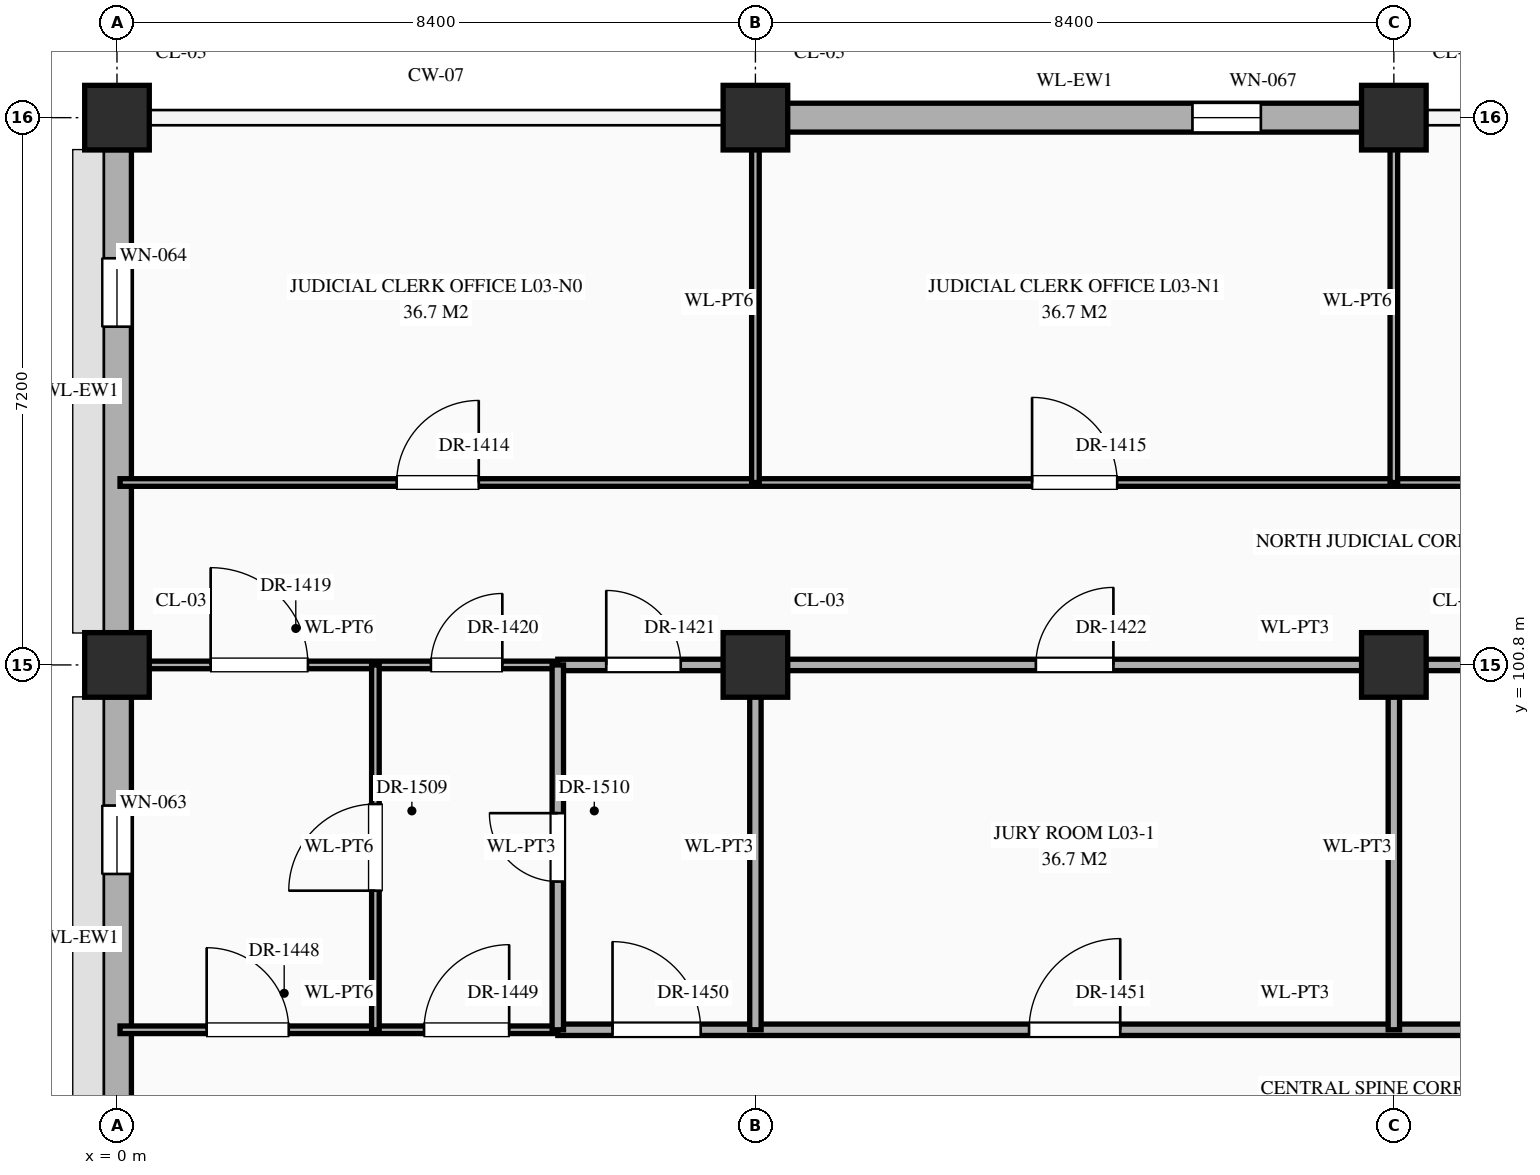
"""IFC4 building model, lengths in metres.
Left out: names, types, materials, properties, quantities, classifications, styles, units other than length and angle.
Written with IfcOpenShell. Run it as: python <this file> out.ifc"""

import sys

from ifc_helpers import new_model, si_unit, direction, frame, frame_2d, origin, origin_2d, place, context, subcontext, project, spatial, rectangle, extrude, element, fill, save


model = new_model("IFC4")
c1 = context("Model", 3, precision=1e-05, world=origin(), true_north=direction((0.0, 1.0)))
c2 = subcontext(c1, "Body", "Model", "MODEL_VIEW")
j1 = project(units=[si_unit("LENGTHUNIT", "METRE"), si_unit("PLANEANGLEUNIT", "RADIAN")], contexts=[c1])
p1 = place(None, origin())
s1 = spatial("IfcSite", under=j1, at=p1, CompositionType="ELEMENT")
p2 = place(p1, origin())
s2 = spatial("IfcBuilding", under=s1, at=p2, CompositionType="ELEMENT")
p3 = place(p2, frame((0.0, 0.0, 10.8)))
s3 = spatial("IfcBuildingStorey", under=s2, at=p3, CompositionType="ELEMENT", Elevation=10.8)
for number, where, z_axis, x_axis in (
    (1, (0.0, 100.8, 0.0), (0.0, 0.0, 1.0), (1.0, 0.0, 0.0)),
    (2, (0.0, 108.0, 0.0), (0.0, 0.0, 1.0), (1.0, 0.0, 0.0)),
    (3, (8.4, 100.8, 0.0), (0.0, 0.0, 1.0), (1.0, 0.0, 0.0)),
    (4, (8.4, 108.0, 0.0), (0.0, 0.0, 1.0), (1.0, 0.0, 0.0)),
    (5, (16.8, 100.8, 0.0), (0.0, 0.0, 1.0), (1.0, 0.0, 0.0)),
    (6, (16.8, 108.0, 0.0), (0.0, 0.0, 1.0), (1.0, 0.0, 0.0)),
):
    element("IfcColumn", number, at=place(p3, frame(where, z_axis=z_axis, x_axis=x_axis)), inside=s3, PredefinedType="COLUMN", context=c2, shape_type="SweptSolid", body=[
        extrude(rectangle(XDim=0.85, YDim=0.85, at=origin_2d()), origin(), (0.0, 0.0, 1.0), 5.4),
    ])
p4 = place(p3, frame((0.0, 94.02, 0.0), z_axis=(0.0, 0.0, 1.0), x_axis=(0.0, 1.0, 0.0)))
e7 = element("IfcWall", 7, at=p4, inside=s3, PredefinedType="STANDARD", context=c2, shape_type="SweptSolid", body=[
    extrude(rectangle(XDim=6.36, YDim=0.38, at=frame_2d((3.18, 0.0))), origin(), (0.0, 0.0, 1.0), 4.47),
])
p5 = place(p4, frame((4.03, 0.0, 0.85)))
e8 = element("IfcOpeningElement", 8, at=p5, cuts=e7, PredefinedType="OPENING", context=c2, shape_type="SweptSolid", body=[
    extrude(rectangle(XDim=0.9, YDim=1.56, at=frame_2d((0.45, 0.78))), frame((0.0, 0.202, 0.0), z_axis=(0.0, -1.0, 0.0), x_axis=(1.0, 0.0, 0.0)), (0.0, 0.0, 1.0), 0.404),
])
p6 = place(p3, frame((0.0, 101.22, 0.0), z_axis=(0.0, 0.0, 1.0), x_axis=(0.0, 1.0, 0.0)))
e9 = element("IfcWall", 9, at=p6, inside=s3, PredefinedType="STANDARD", context=c2, shape_type="SweptSolid", body=[
    extrude(rectangle(XDim=6.36, YDim=0.38, at=frame_2d((3.18, 0.0))), origin(), (0.0, 0.0, 1.0), 4.47),
])
p7 = place(p6, frame((4.03, 0.0, 0.85)))
e10 = element("IfcOpeningElement", 10, at=p7, cuts=e9, PredefinedType="OPENING", context=c2, shape_type="SweptSolid", body=[
    extrude(rectangle(XDim=0.9, YDim=1.74, at=frame_2d((0.45, 0.87))), frame((0.0, 0.202, 0.0), z_axis=(0.0, -1.0, 0.0), x_axis=(1.0, 0.0, 0.0)), (0.0, 0.0, 1.0), 0.404),
])
p8 = place(p3, frame((8.82, 108.0, 0.0), z_axis=(0.0, 0.0, 1.0), x_axis=(1.0, 0.0, 0.0)))
e11 = element("IfcWall", 11, at=p8, inside=s3, PredefinedType="STANDARD", context=c2, shape_type="SweptSolid", body=[
    extrude(rectangle(XDim=7.56, YDim=0.38, at=frame_2d((3.78, 0.0))), origin(), (0.0, 0.0, 1.0), 4.47),
])
p9 = place(p8, frame((5.33, 0.0, 0.85)))
e12 = element("IfcOpeningElement", 12, at=p9, cuts=e11, PredefinedType="OPENING", context=c2, shape_type="SweptSolid", body=[
    extrude(rectangle(XDim=0.9, YDim=1.92, at=frame_2d((0.45, 0.96))), frame((0.0, 0.202, 0.0), z_axis=(0.0, -1.0, 0.0), x_axis=(1.0, 0.0, 0.0)), (0.0, 0.0, 1.0), 0.404),
])
p10 = place(p3, frame((0.04, 96.0, 0.0), z_axis=(0.0, 0.0, 1.0), x_axis=(1.0, 0.0, 0.0)))
e13 = element("IfcWall", 13, at=p10, inside=s3, PredefinedType="STANDARD", context=c2, shape_type="SweptSolid", body=[
    extrude(rectangle(XDim=5.76, YDim=0.1, at=frame_2d((2.88, 0.0))), origin(), (0.0, 0.0, 1.0), 5.12),
])
p11 = place(p10, frame((1.14, 0.0, 0.0)))
e14 = element("IfcOpeningElement", 14, at=p11, cuts=e13, PredefinedType="OPENING", context=c2, shape_type="SweptSolid", body=[
    extrude(rectangle(XDim=1.08, YDim=2.25, at=frame_2d((0.54, 1.125))), frame((0.0, 0.062, 0.0), z_axis=(0.0, -1.0, 0.0), x_axis=(1.0, 0.0, 0.0)), (0.0, 0.0, 1.0), 0.124),
])
p12 = place(p10, frame((4.0, 0.0, 0.0)))
e15 = element("IfcOpeningElement", 15, at=p12, cuts=e13, PredefinedType="OPENING", context=c2, shape_type="SweptSolid", body=[
    extrude(rectangle(XDim=1.12, YDim=2.25, at=frame_2d((0.56, 1.125))), frame((0.0, 0.062, 0.0), z_axis=(0.0, -1.0, 0.0), x_axis=(1.0, 0.0, 0.0)), (0.0, 0.0, 1.0), 0.124),
])
p13 = place(p3, frame((5.8, 96.0, 0.0), z_axis=(0.0, 0.0, 1.0), x_axis=(1.0, 0.0, 0.0)))
e16 = element("IfcWall", 16, at=p13, inside=s3, PredefinedType="STANDARD", context=c2, shape_type="SweptSolid", body=[
    extrude(rectangle(XDim=19.4, YDim=0.15, at=frame_2d((9.7, 0.0))), origin(), (0.0, 0.0, 1.0), 5.12),
])
p14 = place(p13, frame((0.72, 0.0, 0.0)))
e17 = element("IfcOpeningElement", 17, at=p14, cuts=e16, PredefinedType="OPENING", context=c2, shape_type="SweptSolid", body=[
    extrude(rectangle(XDim=1.16, YDim=2.3, at=frame_2d((0.58, 1.15))), frame((0.0, 0.087, 0.0), z_axis=(0.0, -1.0, 0.0), x_axis=(1.0, 0.0, 0.0)), (0.0, 0.0, 1.0), 0.174),
])
p15 = place(p13, frame((6.2, 0.0, 0.0)))
e18 = element("IfcOpeningElement", 18, at=p15, cuts=e16, PredefinedType="OPENING", context=c2, shape_type="SweptSolid", body=[
    extrude(rectangle(XDim=1.2, YDim=2.35, at=frame_2d((0.6, 1.175))), frame((0.0, 0.087, 0.0), z_axis=(0.0, -1.0, 0.0), x_axis=(1.0, 0.0, 0.0)), (0.0, 0.0, 1.0), 0.174),
])
p16 = place(p13, frame((14.58, 0.0, 0.0)))
e19 = element("IfcOpeningElement", 19, at=p16, cuts=e16, PredefinedType="OPENING", context=c2, shape_type="SweptSolid", body=[
    extrude(rectangle(XDim=1.24, YDim=2.3, at=frame_2d((0.62, 1.15))), frame((0.0, 0.087, 0.0), z_axis=(0.0, -1.0, 0.0), x_axis=(1.0, 0.0, 0.0)), (0.0, 0.0, 1.0), 0.174),
])
p17 = place(p3, frame((0.04, 100.8, 0.0), z_axis=(0.0, 0.0, 1.0), x_axis=(1.0, 0.0, 0.0)))
e20 = element("IfcWall", 20, at=p17, inside=s3, PredefinedType="STANDARD", context=c2, shape_type="SweptSolid", body=[
    extrude(rectangle(XDim=5.76, YDim=0.1, at=frame_2d((2.88, 0.0))), origin(), (0.0, 0.0, 1.0), 4.27),
])
p18 = place(p17, frame((1.192, 0.0, 0.0)))
e21 = element("IfcOpeningElement", 21, at=p18, cuts=e20, PredefinedType="OPENING", context=c2, shape_type="SweptSolid", body=[
    extrude(rectangle(XDim=1.28, YDim=2.35, at=frame_2d((0.64, 1.175))), frame((0.0, 0.062, 0.0), z_axis=(0.0, -1.0, 0.0), x_axis=(1.0, 0.0, 0.0)), (0.0, 0.0, 1.0), 0.124),
])
p19 = place(p17, frame((4.09, 0.0, 0.0)))
e22 = element("IfcOpeningElement", 22, at=p19, cuts=e20, PredefinedType="OPENING", context=c2, shape_type="SweptSolid", body=[
    extrude(rectangle(XDim=0.94, YDim=2.3, at=frame_2d((0.47, 1.15))), frame((0.0, 0.062, 0.0), z_axis=(0.0, -1.0, 0.0), x_axis=(1.0, 0.0, 0.0)), (0.0, 0.0, 1.0), 0.124),
])
p20 = place(p3, frame((5.8, 100.8, 0.0), z_axis=(0.0, 0.0, 1.0), x_axis=(1.0, 0.0, 0.0)))
e23 = element("IfcWall", 23, at=p20, inside=s3, PredefinedType="STANDARD", context=c2, shape_type="SweptSolid", body=[
    extrude(rectangle(XDim=19.4, YDim=0.15, at=frame_2d((9.7, 0.0))), origin(), (0.0, 0.0, 1.0), 4.27),
])
p21 = place(p20, frame((0.637, 0.0, 0.0)))
e24 = element("IfcOpeningElement", 24, at=p21, cuts=e23, PredefinedType="OPENING", context=c2, shape_type="SweptSolid", body=[
    extrude(rectangle(XDim=0.98, YDim=2.35, at=frame_2d((0.49, 1.175))), frame((0.0, 0.087, 0.0), z_axis=(0.0, -1.0, 0.0), x_axis=(1.0, 0.0, 0.0)), (0.0, 0.0, 1.0), 0.174),
])
p22 = place(p20, frame((6.29, 0.0, 0.0)))
e25 = element("IfcOpeningElement", 25, at=p22, cuts=e23, PredefinedType="OPENING", context=c2, shape_type="SweptSolid", body=[
    extrude(rectangle(XDim=1.02, YDim=2.4, at=frame_2d((0.51, 1.2))), frame((0.0, 0.087, 0.0), z_axis=(0.0, -1.0, 0.0), x_axis=(1.0, 0.0, 0.0)), (0.0, 0.0, 1.0), 0.174),
])
p23 = place(p20, frame((14.67, 0.0, 0.0)))
e26 = element("IfcOpeningElement", 26, at=p23, cuts=e23, PredefinedType="OPENING", context=c2, shape_type="SweptSolid", body=[
    extrude(rectangle(XDim=1.06, YDim=2.4, at=frame_2d((0.53, 1.2))), frame((0.0, 0.087, 0.0), z_axis=(0.0, -1.0, 0.0), x_axis=(1.0, 0.0, 0.0)), (0.0, 0.0, 1.0), 0.174),
])
p24 = place(p3, frame((0.04, 103.2, 0.0), z_axis=(0.0, 0.0, 1.0), x_axis=(1.0, 0.0, 0.0)))
e27 = element("IfcWall", 27, at=p24, inside=s3, PredefinedType="STANDARD", context=c2, shape_type="SweptSolid", body=[
    extrude(rectangle(XDim=41.96, YDim=0.1, at=frame_2d((20.98, 0.0))), origin(), (0.0, 0.0, 1.0), 5.12),
])
p25 = place(p24, frame((3.64, 0.0, 0.0)))
e28 = element("IfcOpeningElement", 28, at=p25, cuts=e27, PredefinedType="OPENING", context=c2, shape_type="SweptSolid", body=[
    extrude(rectangle(XDim=1.08, YDim=2.25, at=frame_2d((0.54, 1.125))), frame((0.0, 0.062, 0.0), z_axis=(0.0, -1.0, 0.0), x_axis=(1.0, 0.0, 0.0)), (0.0, 0.0, 1.0), 0.124),
])
p26 = place(p24, frame((12.0, 0.0, 0.0)))
e29 = element("IfcOpeningElement", 29, at=p26, cuts=e27, PredefinedType="OPENING", context=c2, shape_type="SweptSolid", body=[
    extrude(rectangle(XDim=1.12, YDim=2.25, at=frame_2d((0.56, 1.125))), frame((0.0, 0.062, 0.0), z_axis=(0.0, -1.0, 0.0), x_axis=(1.0, 0.0, 0.0)), (0.0, 0.0, 1.0), 0.124),
])
p27 = place(p24, frame((20.38, 0.0, 0.0)))
e30 = element("IfcOpeningElement", 30, at=p27, cuts=e27, PredefinedType="OPENING", context=c2, shape_type="SweptSolid", body=[
    extrude(rectangle(XDim=1.16, YDim=2.3, at=frame_2d((0.58, 1.15))), frame((0.0, 0.062, 0.0), z_axis=(0.0, -1.0, 0.0), x_axis=(1.0, 0.0, 0.0)), (0.0, 0.0, 1.0), 0.124),
])
p28 = place(p24, frame((28.76, 0.0, 0.0)))
e31 = element("IfcOpeningElement", 31, at=p28, cuts=e27, PredefinedType="OPENING", context=c2, shape_type="SweptSolid", body=[
    extrude(rectangle(XDim=1.2, YDim=2.35, at=frame_2d((0.6, 1.175))), frame((0.0, 0.062, 0.0), z_axis=(0.0, -1.0, 0.0), x_axis=(1.0, 0.0, 0.0)), (0.0, 0.0, 1.0), 0.124),
])
p29 = place(p24, frame((37.14, 0.0, 0.0)))
e32 = element("IfcOpeningElement", 32, at=p29, cuts=e27, PredefinedType="OPENING", context=c2, shape_type="SweptSolid", body=[
    extrude(rectangle(XDim=1.24, YDim=2.3, at=frame_2d((0.62, 1.15))), frame((0.0, 0.062, 0.0), z_axis=(0.0, -1.0, 0.0), x_axis=(1.0, 0.0, 0.0)), (0.0, 0.0, 1.0), 0.124),
])
p30 = place(p3, frame((3.4, 96.0, 0.0), z_axis=(0.0, 0.0, 1.0), x_axis=(0.0, 1.0, 0.0)))
e33 = element("IfcWall", 33, at=p30, inside=s3, PredefinedType="STANDARD", context=c2, shape_type="SweptSolid", body=[
    extrude(rectangle(XDim=4.8, YDim=0.1, at=frame_2d((2.4, 0.0))), origin(), (0.0, 0.0, 1.0), 5.12),
])
p31 = place(p30, frame((1.83, 0.0, 0.0)))
e34 = element("IfcOpeningElement", 34, at=p31, cuts=e33, PredefinedType="OPENING", context=c2, shape_type="SweptSolid", body=[
    extrude(rectangle(XDim=1.14, YDim=2.4, at=frame_2d((0.57, 1.2))), frame((0.0, 0.062, 0.0), z_axis=(0.0, -1.0, 0.0), x_axis=(1.0, 0.0, 0.0)), (0.0, 0.0, 1.0), 0.124),
])
p32 = place(p3, frame((5.8, 96.0, 0.0), z_axis=(0.0, 0.0, 1.0), x_axis=(0.0, 1.0, 0.0)))
e35 = element("IfcWall", 35, at=p32, inside=s3, PredefinedType="STANDARD", context=c2, shape_type="SweptSolid", body=[
    extrude(rectangle(XDim=4.8, YDim=0.15, at=frame_2d((2.4, 0.0))), origin(), (0.0, 0.0, 1.0), 5.12),
])
p33 = place(p32, frame((1.95, 0.0, 0.0)))
e36 = element("IfcOpeningElement", 36, at=p33, cuts=e35, PredefinedType="OPENING", context=c2, shape_type="SweptSolid", body=[
    extrude(rectangle(XDim=0.9, YDim=2.15, at=frame_2d((0.45, 1.075))), frame((0.0, 0.087, 0.0), z_axis=(0.0, -1.0, 0.0), x_axis=(1.0, 0.0, 0.0)), (0.0, 0.0, 1.0), 0.174),
])
p34 = place(p3, frame((8.4, 96.0, 0.0), z_axis=(0.0, 0.0, 1.0), x_axis=(0.0, 1.0, 0.0)))
e37 = element("IfcWall", 37, at=p34, inside=s3, PredefinedType="STANDARD", context=c2, shape_type="SweptSolid", body=[
    extrude(rectangle(XDim=4.8, YDim=0.15, at=frame_2d((2.4, 0.0))), origin(), (0.0, 0.0, 1.0), 4.37),
])
p35 = place(p3, frame((8.4, 103.2, 0.0), z_axis=(0.0, 0.0, 1.0), x_axis=(0.0, 1.0, 0.0)))
e38 = element("IfcWall", 38, at=p35, inside=s3, PredefinedType="STANDARD", context=c2, shape_type="SweptSolid", body=[
    extrude(rectangle(XDim=4.76, YDim=0.1, at=frame_2d((2.38, 0.0))), origin(), (0.0, 0.0, 1.0), 4.37),
])
p36 = place(p3, frame((16.8, 96.0, 0.0), z_axis=(0.0, 0.0, 1.0), x_axis=(0.0, 1.0, 0.0)))
e39 = element("IfcWall", 39, at=p36, inside=s3, PredefinedType="STANDARD", context=c2, shape_type="SweptSolid", body=[
    extrude(rectangle(XDim=4.8, YDim=0.15, at=frame_2d((2.4, 0.0))), origin(), (0.0, 0.0, 1.0), 4.37),
])
p37 = place(p3, frame((16.8, 103.2, 0.0), z_axis=(0.0, 0.0, 1.0), x_axis=(0.0, 1.0, 0.0)))
e40 = element("IfcWall", 40, at=p37, inside=s3, PredefinedType="STANDARD", context=c2, shape_type="SweptSolid", body=[
    extrude(rectangle(XDim=4.76, YDim=0.1, at=frame_2d((2.38, 0.0))), origin(), (0.0, 0.0, 1.0), 4.37),
])
p38 = place(p5, origin())
e41 = element("IfcWindow", 41, at=p38, inside=s3, PartitioningType="SINGLE_PANEL", PredefinedType="WINDOW", context=c2, shape_type="SweptSolid", body=[
    extrude(rectangle(XDim=0.9, YDim=1.56, at=frame_2d((0.45, 0.78))), frame((0.0, 0.03, 0.0), z_axis=(0.0, -1.0, 0.0), x_axis=(1.0, 0.0, 0.0)), (0.0, 0.0, 1.0), 0.06),
])
fill(e8, e41)
p39 = place(p7, origin())
e42 = element("IfcWindow", 42, at=p39, inside=s3, PartitioningType="SINGLE_PANEL", PredefinedType="WINDOW", context=c2, shape_type="SweptSolid", body=[
    extrude(rectangle(XDim=0.9, YDim=1.74, at=frame_2d((0.45, 0.87))), frame((0.0, 0.03, 0.0), z_axis=(0.0, -1.0, 0.0), x_axis=(1.0, 0.0, 0.0)), (0.0, 0.0, 1.0), 0.06),
])
fill(e10, e42)
p40 = place(p9, origin())
e43 = element("IfcWindow", 43, at=p40, inside=s3, PartitioningType="SINGLE_PANEL", PredefinedType="WINDOW", context=c2, shape_type="SweptSolid", body=[
    extrude(rectangle(XDim=0.9, YDim=1.92, at=frame_2d((0.45, 0.96))), frame((0.0, 0.03, 0.0), z_axis=(0.0, -1.0, 0.0), x_axis=(1.0, 0.0, 0.0)), (0.0, 0.0, 1.0), 0.06),
])
fill(e12, e43)
p41 = place(p25, origin())
e44 = element("IfcDoor", 44, at=p41, inside=s3, OperationType="SINGLE_SWING_RIGHT", PredefinedType="DOOR", context=c2, shape_type="SweptSolid", body=[
    extrude(rectangle(XDim=1.08, YDim=2.25, at=frame_2d((0.54, 1.125))), frame((0.0, 0.025, 0.0), z_axis=(0.0, -1.0, 0.0), x_axis=(1.0, 0.0, 0.0)), (0.0, 0.0, 1.0), 0.05),
])
fill(e28, e44)
p42 = place(p26, origin())
e45 = element("IfcDoor", 45, at=p42, inside=s3, OperationType="SINGLE_SWING_LEFT", PredefinedType="DOOR", context=c2, shape_type="SweptSolid", body=[
    extrude(rectangle(XDim=1.12, YDim=2.25, at=frame_2d((0.56, 1.125))), frame((0.0, 0.025, 0.0), z_axis=(0.0, -1.0, 0.0), x_axis=(1.0, 0.0, 0.0)), (0.0, 0.0, 1.0), 0.05),
])
fill(e29, e45)
p43 = place(p18, origin())
e46 = element("IfcDoor", 46, at=p43, inside=s3, OperationType="SINGLE_SWING_LEFT", PredefinedType="DOOR", context=c2, shape_type="SweptSolid", body=[
    extrude(rectangle(XDim=1.28, YDim=2.35, at=frame_2d((0.64, 1.175))), frame((0.0, 0.025, 0.0), z_axis=(0.0, -1.0, 0.0), x_axis=(1.0, 0.0, 0.0)), (0.0, 0.0, 1.0), 0.05),
])
fill(e21, e46)
p44 = place(p19, origin())
e47 = element("IfcDoor", 47, at=p44, inside=s3, OperationType="SINGLE_SWING_RIGHT", PredefinedType="DOOR", context=c2, shape_type="SweptSolid", body=[
    extrude(rectangle(XDim=0.94, YDim=2.3, at=frame_2d((0.47, 1.15))), frame((0.0, 0.025, 0.0), z_axis=(0.0, -1.0, 0.0), x_axis=(1.0, 0.0, 0.0)), (0.0, 0.0, 1.0), 0.05),
])
fill(e22, e47)
p45 = place(p21, origin())
e48 = element("IfcDoor", 48, at=p45, inside=s3, OperationType="SINGLE_SWING_LEFT", PredefinedType="DOOR", context=c2, shape_type="SweptSolid", body=[
    extrude(rectangle(XDim=0.98, YDim=2.35, at=frame_2d((0.49, 1.175))), frame((0.0, 0.025, 0.0), z_axis=(0.0, -1.0, 0.0), x_axis=(1.0, 0.0, 0.0)), (0.0, 0.0, 1.0), 0.05),
])
fill(e24, e48)
p46 = place(p22, origin())
e49 = element("IfcDoor", 49, at=p46, inside=s3, OperationType="SINGLE_SWING_RIGHT", PredefinedType="DOOR", context=c2, shape_type="SweptSolid", body=[
    extrude(rectangle(XDim=1.02, YDim=2.4, at=frame_2d((0.51, 1.2))), frame((0.0, 0.025, 0.0), z_axis=(0.0, -1.0, 0.0), x_axis=(1.0, 0.0, 0.0)), (0.0, 0.0, 1.0), 0.05),
])
fill(e25, e49)
p47 = place(p11, origin())
e50 = element("IfcDoor", 50, at=p47, inside=s3, OperationType="SINGLE_SWING_LEFT", PredefinedType="DOOR", context=c2, shape_type="SweptSolid", body=[
    extrude(rectangle(XDim=1.08, YDim=2.25, at=frame_2d((0.54, 1.125))), frame((0.0, 0.025, 0.0), z_axis=(0.0, -1.0, 0.0), x_axis=(1.0, 0.0, 0.0)), (0.0, 0.0, 1.0), 0.05),
])
fill(e14, e50)
p48 = place(p12, origin())
e51 = element("IfcDoor", 51, at=p48, inside=s3, OperationType="SINGLE_SWING_RIGHT", PredefinedType="DOOR", context=c2, shape_type="SweptSolid", body=[
    extrude(rectangle(XDim=1.12, YDim=2.25, at=frame_2d((0.56, 1.125))), frame((0.0, 0.025, 0.0), z_axis=(0.0, -1.0, 0.0), x_axis=(1.0, 0.0, 0.0)), (0.0, 0.0, 1.0), 0.05),
])
fill(e15, e51)
p49 = place(p14, origin())
e52 = element("IfcDoor", 52, at=p49, inside=s3, OperationType="SINGLE_SWING_LEFT", PredefinedType="DOOR", context=c2, shape_type="SweptSolid", body=[
    extrude(rectangle(XDim=1.16, YDim=2.3, at=frame_2d((0.58, 1.15))), frame((0.0, 0.025, 0.0), z_axis=(0.0, -1.0, 0.0), x_axis=(1.0, 0.0, 0.0)), (0.0, 0.0, 1.0), 0.05),
])
fill(e17, e52)
p50 = place(p15, origin())
e53 = element("IfcDoor", 53, at=p50, inside=s3, OperationType="SINGLE_SWING_RIGHT", PredefinedType="DOOR", context=c2, shape_type="SweptSolid", body=[
    extrude(rectangle(XDim=1.2, YDim=2.35, at=frame_2d((0.6, 1.175))), frame((0.0, 0.025, 0.0), z_axis=(0.0, -1.0, 0.0), x_axis=(1.0, 0.0, 0.0)), (0.0, 0.0, 1.0), 0.05),
])
fill(e18, e53)
p51 = place(p31, origin())
e54 = element("IfcDoor", 54, at=p51, inside=s3, OperationType="SINGLE_SWING_LEFT", PredefinedType="DOOR", context=c2, shape_type="SweptSolid", body=[
    extrude(rectangle(XDim=1.14, YDim=2.4, at=frame_2d((0.57, 1.2))), frame((0.0, 0.025, 0.0), z_axis=(0.0, -1.0, 0.0), x_axis=(1.0, 0.0, 0.0)), (0.0, 0.0, 1.0), 0.05),
])
fill(e34, e54)
p52 = place(p33, origin())
e55 = element("IfcDoor", 55, at=p52, inside=s3, OperationType="SINGLE_SWING_RIGHT", PredefinedType="DOOR", context=c2, shape_type="SweptSolid", body=[
    extrude(rectangle(XDim=0.9, YDim=2.15, at=frame_2d((0.45, 1.075))), frame((0.0, 0.025, 0.0), z_axis=(0.0, -1.0, 0.0), x_axis=(1.0, 0.0, 0.0)), (0.0, 0.0, 1.0), 0.05),
])
fill(e36, e55)
save(model, sys.argv[1])
